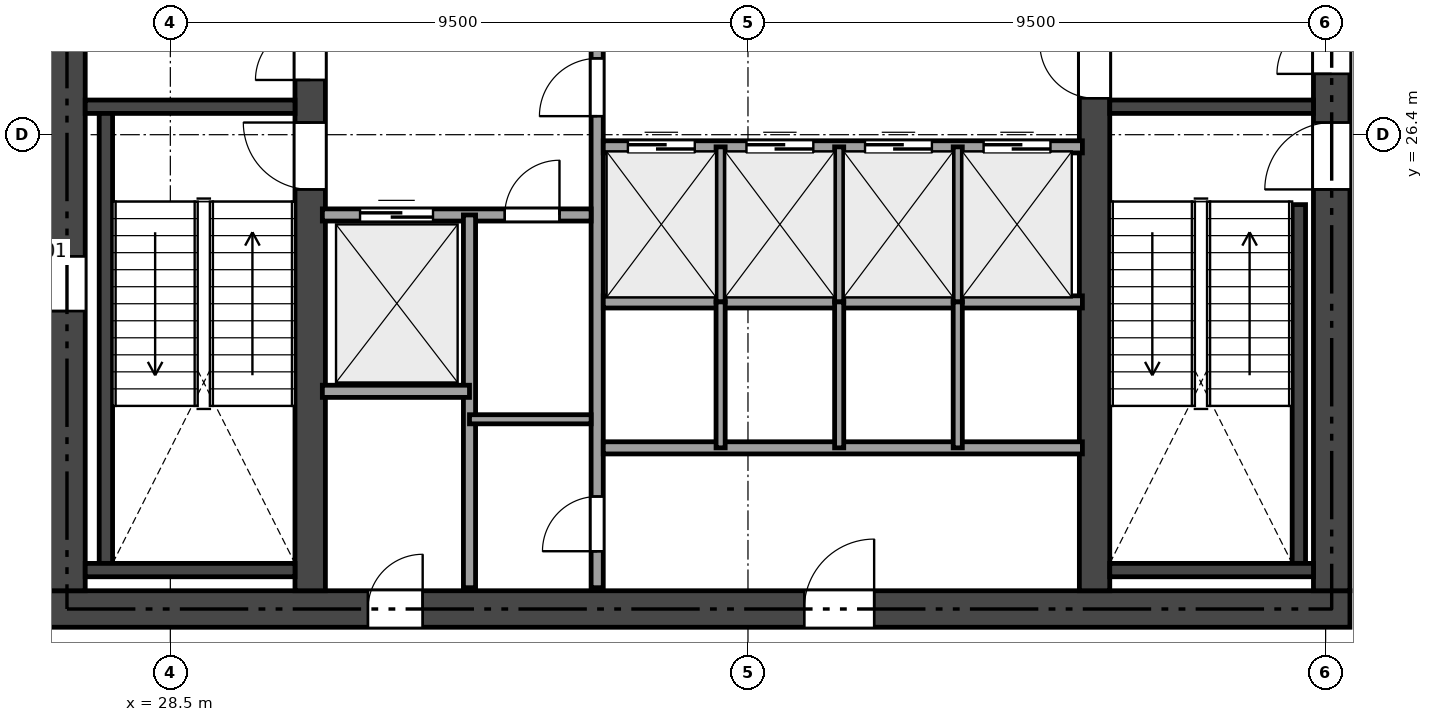
"""IFC4 building model, lengths in metres.
Left out: names, types, materials, properties, quantities, classifications, styles, units other than length and angle.
Written with IfcOpenShell. Run it as: python <this file> out.ifc"""

import sys

from ifc_helpers import new_model, si_unit, direction, frame, frame_2d, origin, place, context, subcontext, project, spatial, rectangle, extrude, element, fill, save


model = new_model("IFC4")
c1 = context("Model", 3, precision=1e-05, world=origin(), true_north=direction((0.0, 1.0)))
c2 = subcontext(c1, "Body", "Model", "MODEL_VIEW")
j1 = project(units=[si_unit("LENGTHUNIT", "METRE"), si_unit("PLANEANGLEUNIT", "RADIAN")], contexts=[c1])
p1 = place(None, origin())
s1 = spatial("IfcSite", under=j1, at=p1, CompositionType="ELEMENT")
p2 = place(p1, origin())
s2 = spatial("IfcBuilding", under=s1, at=p2, CompositionType="ELEMENT")
p3 = place(p2, frame((0.0, 0.0, 121.2)))
s3 = spatial("IfcBuildingStorey", under=s2, at=p3, CompositionType="ELEMENT", Elevation=121.2)
p4 = place(p3, frame((26.5, 18.6, 0.0), z_axis=(0.0, 0.0, 1.0), x_axis=(1.0, 0.0, 0.0)))
e1 = element("IfcWall", 1, at=p4, inside=s3, PredefinedType="SHEAR", context=c2, shape_type="SweptSolid", body=[
    extrude(rectangle(XDim=21.4, YDim=0.6, at=frame_2d((10.7, 0.0))), origin(), (0.0, 0.0, 1.0), 4.08),
])
p5 = place(p4, frame((12.425, 0.0, 0.0)))
e2 = element("IfcOpeningElement", 2, at=p5, cuts=e1, PredefinedType="OPENING", context=c2, shape_type="SweptSolid", body=[
    extrude(rectangle(XDim=1.15, YDim=2.15, at=frame_2d((0.575, 1.075))), frame((0.0, 0.31, 0.0), z_axis=(0.0, -1.0, 0.0), x_axis=(1.0, 0.0, 0.0)), (0.0, 0.0, 1.0), 0.62),
])
p6 = place(p4, frame((5.25, 0.0, 0.0)))
e3 = element("IfcOpeningElement", 3, at=p6, cuts=e1, PredefinedType="OPENING", context=c2, shape_type="SweptSolid", body=[
    extrude(rectangle(XDim=0.9, YDim=2.1, at=frame_2d((0.45, 1.05))), frame((0.0, 0.31, 0.0), z_axis=(0.0, -1.0, 0.0), x_axis=(1.0, 0.0, 0.0)), (0.0, 0.0, 1.0), 0.62),
])
p7 = place(p3, frame((26.8, 18.9, 0.0), z_axis=(0.0, 0.0, 1.0), x_axis=(0.0, 1.0, 0.0)))
e4 = element("IfcWall", 4, at=p7, inside=s3, PredefinedType="SHEAR", context=c2, shape_type="SweptSolid", body=[
    extrude(rectangle(XDim=15.0, YDim=0.6, at=frame_2d((7.5, 0.0))), origin(), (0.0, 0.0, 1.0), 4.08),
])
p8 = place(p7, frame((4.6, 0.0, 0.02)))
e5 = element("IfcOpeningElement", 5, at=p8, cuts=e4, PredefinedType="OPENING", context=c2, shape_type="SweptSolid", body=[
    extrude(rectangle(XDim=0.9, YDim=2.02, at=frame_2d((0.45, 1.01))), frame((0.0, 0.31, 0.0), z_axis=(0.0, -1.0, 0.0), x_axis=(1.0, 0.0, 0.0)), (0.0, 0.0, 1.0), 0.62),
])
p9 = place(p3, frame((47.6, 18.9, 0.0), z_axis=(0.0, 0.0, 1.0), x_axis=(0.0, 1.0, 0.0)))
e6 = element("IfcWall", 6, at=p9, inside=s3, PredefinedType="SHEAR", context=c2, shape_type="SweptSolid", body=[
    extrude(rectangle(XDim=15.0, YDim=0.6, at=frame_2d((7.5, 0.0))), origin(), (0.0, 0.0, 1.0), 4.08),
])
p10 = place(p9, frame((6.6, 0.0, 0.0)))
e7 = element("IfcOpeningElement", 7, at=p10, cuts=e6, PredefinedType="OPENING", context=c2, shape_type="SweptSolid", body=[
    extrude(rectangle(XDim=1.1, YDim=2.15, at=frame_2d((0.55, 1.075))), frame((0.0, 0.31, 0.0), z_axis=(0.0, -1.0, 0.0), x_axis=(1.0, 0.0, 0.0)), (0.0, 0.0, 1.0), 0.62),
])
p11 = place(p9, frame((8.5, 0.0, 0.0)))
e8 = element("IfcOpeningElement", 8, at=p11, cuts=e6, PredefinedType="OPENING", context=c2, shape_type="SweptSolid", body=[
    extrude(rectangle(XDim=0.9, YDim=2.1, at=frame_2d((0.45, 1.05))), frame((0.0, 0.31, 0.0), z_axis=(0.0, -1.0, 0.0), x_axis=(1.0, 0.0, 0.0)), (0.0, 0.0, 1.0), 0.62),
])
p12 = place(p9, frame((13.15, 0.0, 0.0)))
e9 = element("IfcOpeningElement", 9, at=p12, cuts=e6, PredefinedType="OPENING", context=c2, shape_type="SweptSolid", body=[
    extrude(rectangle(XDim=0.9, YDim=2.1, at=frame_2d((0.45, 1.05))), frame((0.0, 0.31, 0.0), z_axis=(0.0, -1.0, 0.0), x_axis=(1.0, 0.0, 0.0)), (0.0, 0.0, 1.0), 0.62),
])
p13 = place(p3, frame((30.8, 18.9, 0.0), z_axis=(0.0, 0.0, 1.0), x_axis=(0.0, 1.0, 0.0)))
e10 = element("IfcWall", 10, at=p13, inside=s3, PredefinedType="SHEAR", context=c2, shape_type="SweptSolid", body=[
    extrude(rectangle(XDim=15.0, YDim=0.5, at=frame_2d((7.5, 0.0))), origin(), (0.0, 0.0, 1.0), 4.08),
])
p14 = place(p13, frame((6.6, 0.0, 0.0)))
e11 = element("IfcOpeningElement", 11, at=p14, cuts=e10, PredefinedType="OPENING", context=c2, shape_type="SweptSolid", body=[
    extrude(rectangle(XDim=1.1, YDim=2.15, at=frame_2d((0.55, 1.075))), frame((0.0, 0.26, 0.0), z_axis=(0.0, -1.0, 0.0), x_axis=(1.0, 0.0, 0.0)), (0.0, 0.0, 1.0), 0.52),
])
p15 = place(p13, frame((8.4, 0.0, 0.0)))
e12 = element("IfcOpeningElement", 12, at=p15, cuts=e10, PredefinedType="OPENING", context=c2, shape_type="SweptSolid", body=[
    extrude(rectangle(XDim=0.9, YDim=2.1, at=frame_2d((0.45, 1.05))), frame((0.0, 0.26, 0.0), z_axis=(0.0, -1.0, 0.0), x_axis=(1.0, 0.0, 0.0)), (0.0, 0.0, 1.0), 0.52),
])
p16 = place(p3, frame((43.7, 18.9, 0.0), z_axis=(0.0, 0.0, 1.0), x_axis=(0.0, 1.0, 0.0)))
e13 = element("IfcWall", 13, at=p16, inside=s3, PredefinedType="SHEAR", context=c2, shape_type="SweptSolid", body=[
    extrude(rectangle(XDim=15.0, YDim=0.5, at=frame_2d((7.5, 0.0))), origin(), (0.0, 0.0, 1.0), 4.08),
])
p17 = place(p16, frame((8.1, 0.0, 0.0)))
e14 = element("IfcOpeningElement", 14, at=p17, cuts=e13, PredefinedType="OPENING", context=c2, shape_type="SweptSolid", body=[
    extrude(rectangle(XDim=0.9, YDim=2.1, at=frame_2d((0.45, 1.05))), frame((0.0, 0.26, 0.0), z_axis=(0.0, -1.0, 0.0), x_axis=(1.0, 0.0, 0.0)), (0.0, 0.0, 1.0), 0.52),
])
p18 = place(p3, frame((27.1, 26.86, 0.0), z_axis=(0.0, 0.0, 1.0), x_axis=(1.0, 0.0, 0.0)))
e15 = element("IfcWall", 15, at=p18, inside=s3, PredefinedType="SHEAR", context=c2, shape_type="SweptSolid", body=[
    extrude(rectangle(XDim=3.45, YDim=0.22, at=frame_2d((1.725, 0.0))), origin(), (0.0, 0.0, 1.0), 4.08),
])
p19 = place(p3, frame((27.44, 19.35, 0.0), z_axis=(0.0, 0.0, 1.0), x_axis=(0.0, 1.0, 0.0)))
e16 = element("IfcWall", 16, at=p19, inside=s3, PredefinedType="SHEAR", context=c2, shape_type="SweptSolid", body=[
    extrude(rectangle(XDim=7.4, YDim=0.22, at=frame_2d((3.7, 0.0))), origin(), (0.0, 0.0, 1.0), 4.08),
])
p20 = place(p3, frame((27.1, 19.24, 0.0), z_axis=(0.0, 0.0, 1.0), x_axis=(1.0, 0.0, 0.0)))
e17 = element("IfcWall", 17, at=p20, inside=s3, PredefinedType="SHEAR", context=c2, shape_type="SweptSolid", body=[
    extrude(rectangle(XDim=3.45, YDim=0.22, at=frame_2d((1.725, 0.0))), origin(), (0.0, 0.0, 1.0), 4.08),
])
p21 = place(p3, frame((43.95, 26.86, 0.0), z_axis=(0.0, 0.0, 1.0), x_axis=(1.0, 0.0, 0.0)))
e18 = element("IfcWall", 18, at=p21, inside=s3, PredefinedType="SHEAR", context=c2, shape_type="SweptSolid", body=[
    extrude(rectangle(XDim=3.35, YDim=0.22, at=frame_2d((1.675, 0.0))), origin(), (0.0, 0.0, 1.0), 4.08),
])
p22 = place(p3, frame((47.06, 19.35, 0.0), z_axis=(0.0, 0.0, 1.0), x_axis=(0.0, 1.0, 0.0)))
e19 = element("IfcWall", 19, at=p22, inside=s3, PredefinedType="SHEAR", context=c2, shape_type="SweptSolid", body=[
    extrude(rectangle(XDim=5.9, YDim=0.22, at=frame_2d((2.95, 0.0))), origin(), (0.0, 0.0, 1.0), 4.08),
])
p23 = place(p3, frame((43.95, 19.24, 0.0), z_axis=(0.0, 0.0, 1.0), x_axis=(1.0, 0.0, 0.0)))
e20 = element("IfcWall", 20, at=p23, inside=s3, PredefinedType="SHEAR", context=c2, shape_type="SweptSolid", body=[
    extrude(rectangle(XDim=3.35, YDim=0.22, at=frame_2d((1.675, 0.0))), origin(), (0.0, 0.0, 1.0), 4.08),
])
p24 = place(p3, frame((35.52, 18.95, 0.0), z_axis=(0.0, 0.0, 1.0), x_axis=(0.0, 1.0, 0.0)))
e21 = element("IfcWall", 21, at=p24, inside=s3, PredefinedType="SOLIDWALL", context=c2, shape_type="SweptSolid", body=[
    extrude(rectangle(XDim=14.9, YDim=0.2, at=frame_2d((7.45, 0.0))), origin(), (0.0, 0.0, 1.0), 3.601),
])
p25 = place(p24, frame((7.755, 0.0, 0.0)))
e22 = element("IfcOpeningElement", 22, at=p25, cuts=e21, PredefinedType="OPENING", context=c2, shape_type="SweptSolid", body=[
    extrude(rectangle(XDim=0.95, YDim=2.15, at=frame_2d((0.475, 1.075))), frame((0.0, 0.11, 0.0), z_axis=(0.0, -1.0, 0.0), x_axis=(1.0, 0.0, 0.0)), (0.0, 0.0, 1.0), 0.22),
])
p26 = place(p24, frame((0.6, 0.0, 0.0)))
e23 = element("IfcOpeningElement", 23, at=p26, cuts=e21, PredefinedType="OPENING", context=c2, shape_type="SweptSolid", body=[
    extrude(rectangle(XDim=0.9, YDim=2.1, at=frame_2d((0.45, 1.05))), frame((0.0, 0.11, 0.0), z_axis=(0.0, -1.0, 0.0), x_axis=(1.0, 0.0, 0.0)), (0.0, 0.0, 1.0), 0.22),
])
p27 = place(p3, frame((31.0, 25.08, 0.0), z_axis=(0.0, 0.0, 1.0), x_axis=(1.0, 0.0, 0.0)))
e24 = element("IfcWall", 24, at=p27, inside=s3, PredefinedType="SOLIDWALL", context=c2, shape_type="SweptSolid", body=[
    extrude(rectangle(XDim=4.42, YDim=0.2, at=frame_2d((2.21, 0.0))), origin(), (0.0, 0.0, 1.0), 4.08),
])
p28 = place(p27, frame((3.0, 0.0, 0.0)))
e25 = element("IfcOpeningElement", 25, at=p28, cuts=e24, PredefinedType="OPENING", context=c2, shape_type="SweptSolid", body=[
    extrude(rectangle(XDim=0.9, YDim=2.1, at=frame_2d((0.45, 1.05))), frame((0.0, 0.11, 0.0), z_axis=(0.0, -1.0, 0.0), x_axis=(1.0, 0.0, 0.0)), (0.0, 0.0, 1.0), 0.22),
])
p29 = place(p27, frame((0.62, 0.0, 0.0)))
e26 = element("IfcOpeningElement", 26, at=p29, cuts=e24, PredefinedType="OPENING", context=c2, shape_type="SweptSolid", body=[
    extrude(rectangle(XDim=1.2, YDim=2.15, at=frame_2d((0.6, 1.075))), frame((0.0, 0.11, 0.0), z_axis=(0.0, -1.0, 0.0), x_axis=(1.0, 0.0, 0.0)), (0.0, 0.0, 1.0), 0.22),
])
p30 = place(p3, frame((33.42, 18.95, 0.0), z_axis=(0.0, 0.0, 1.0), x_axis=(0.0, 1.0, 0.0)))
e27 = element("IfcWall", 27, at=p30, inside=s3, PredefinedType="SOLIDWALL", context=c2, shape_type="SweptSolid", body=[
    extrude(rectangle(XDim=6.13, YDim=0.2, at=frame_2d((3.065, 0.0))), origin(), (0.0, 0.0, 1.0), 3.601),
])
p31 = place(p3, frame((31.0, 22.18, 0.0), z_axis=(0.0, 0.0, 1.0), x_axis=(1.0, 0.0, 0.0)))
e28 = element("IfcWall", 28, at=p31, inside=s3, PredefinedType="SOLIDWALL", context=c2, shape_type="SweptSolid", body=[
    extrude(rectangle(XDim=2.42, YDim=0.2, at=frame_2d((1.21, 0.0))), origin(), (0.0, 0.0, 1.0), 4.08),
])
p32 = place(p3, frame((33.42, 21.72, 0.0), z_axis=(0.0, 0.0, 1.0), x_axis=(1.0, 0.0, 0.0)))
e29 = element("IfcWall", 29, at=p32, inside=s3, PredefinedType="PARTITIONING", context=c2, shape_type="SweptSolid", body=[
    extrude(rectangle(XDim=2.0, YDim=0.15, at=frame_2d((1.0, 0.0))), origin(), (0.0, 0.0, 1.0), 4.08),
])
p33 = place(p3, frame((35.62, 26.2, 0.0), z_axis=(0.0, 0.0, 1.0), x_axis=(1.0, 0.0, 0.0)))
e30 = element("IfcWall", 30, at=p33, inside=s3, PredefinedType="SOLIDWALL", context=c2, shape_type="SweptSolid", body=[
    extrude(rectangle(XDim=7.88, YDim=0.2, at=frame_2d((3.94, 0.0))), origin(), (0.0, 0.0, 1.0), 4.08),
])
p34 = place(p33, frame((0.405, 0.0, 0.0)))
e31 = element("IfcOpeningElement", 31, at=p34, cuts=e30, PredefinedType="OPENING", context=c2, shape_type="SweptSolid", body=[
    extrude(rectangle(XDim=1.1, YDim=2.15, at=frame_2d((0.55, 1.075))), frame((0.0, 0.11, 0.0), z_axis=(0.0, -1.0, 0.0), x_axis=(1.0, 0.0, 0.0)), (0.0, 0.0, 1.0), 0.22),
])
p35 = place(p33, frame((2.355, 0.0, 0.0)))
e32 = element("IfcOpeningElement", 32, at=p35, cuts=e30, PredefinedType="OPENING", context=c2, shape_type="SweptSolid", body=[
    extrude(rectangle(XDim=1.1, YDim=2.15, at=frame_2d((0.55, 1.075))), frame((0.0, 0.11, 0.0), z_axis=(0.0, -1.0, 0.0), x_axis=(1.0, 0.0, 0.0)), (0.0, 0.0, 1.0), 0.22),
])
p36 = place(p33, frame((4.305, 0.0, 0.0)))
e33 = element("IfcOpeningElement", 33, at=p36, cuts=e30, PredefinedType="OPENING", context=c2, shape_type="SweptSolid", body=[
    extrude(rectangle(XDim=1.1, YDim=2.15, at=frame_2d((0.55, 1.075))), frame((0.0, 0.11, 0.0), z_axis=(0.0, -1.0, 0.0), x_axis=(1.0, 0.0, 0.0)), (0.0, 0.0, 1.0), 0.22),
])
p37 = place(p33, frame((6.255, 0.0, 0.0)))
e34 = element("IfcOpeningElement", 34, at=p37, cuts=e30, PredefinedType="OPENING", context=c2, shape_type="SweptSolid", body=[
    extrude(rectangle(XDim=1.1, YDim=2.15, at=frame_2d((0.55, 1.075))), frame((0.0, 0.11, 0.0), z_axis=(0.0, -1.0, 0.0), x_axis=(1.0, 0.0, 0.0)), (0.0, 0.0, 1.0), 0.22),
])
p38 = place(p3, frame((35.62, 23.65, 0.0), z_axis=(0.0, 0.0, 1.0), x_axis=(1.0, 0.0, 0.0)))
e35 = element("IfcWall", 35, at=p38, inside=s3, PredefinedType="SOLIDWALL", context=c2, shape_type="SweptSolid", body=[
    extrude(rectangle(XDim=7.88, YDim=0.2, at=frame_2d((3.94, 0.0))), origin(), (0.0, 0.0, 1.0), 3.601),
])
p39 = place(p3, frame((35.62, 21.25, 0.0), z_axis=(0.0, 0.0, 1.0), x_axis=(1.0, 0.0, 0.0)))
e36 = element("IfcWall", 36, at=p39, inside=s3, PredefinedType="SOLIDWALL", context=c2, shape_type="SweptSolid", body=[
    extrude(rectangle(XDim=7.88, YDim=0.2, at=frame_2d((3.94, 0.0))), origin(), (0.0, 0.0, 1.0), 4.08),
])
for number, where, z_axis, x_axis in (
    (37, (37.55, 23.65, 0.0), (0.0, 0.0, 1.0), (0.0, 1.0, 0.0)),
    (38, (39.5, 23.65, 0.0), (0.0, 0.0, 1.0), (0.0, 1.0, 0.0)),
    (39, (41.45, 23.65, 0.0), (0.0, 0.0, 1.0), (0.0, 1.0, 0.0)),
):
    element("IfcWall", number, at=place(p3, frame(where, z_axis=z_axis, x_axis=x_axis)), inside=s3, PredefinedType="PARTITIONING", context=c2, shape_type="SweptSolid", body=[
        extrude(rectangle(XDim=2.55, YDim=0.15, at=frame_2d((1.275, 0.0))), origin(), (0.0, 0.0, 1.0), 3.601),
    ])
for number, where, z_axis, x_axis in (
    (40, (37.55, 21.25, 0.0), (0.0, 0.0, 1.0), (0.0, 1.0, 0.0)),
    (41, (39.5, 21.25, 0.0), (0.0, 0.0, 1.0), (0.0, 1.0, 0.0)),
    (42, (41.45, 21.25, 0.0), (0.0, 0.0, 1.0), (0.0, 1.0, 0.0)),
):
    element("IfcWall", number, at=place(p3, frame(where, z_axis=z_axis, x_axis=x_axis)), inside=s3, PredefinedType="PARTITIONING", context=c2, shape_type="SweptSolid", body=[
        extrude(rectangle(XDim=2.4, YDim=0.15, at=frame_2d((1.2, 0.0))), origin(), (0.0, 0.0, 1.0), 3.601),
    ])
p40 = place(p8, origin())
e43 = element("IfcDoor", 43, at=p40, inside=s3, OperationType="SINGLE_SWING_LEFT", PredefinedType="TRAPDOOR", context=c2, shape_type="SweptSolid", body=[
    extrude(rectangle(XDim=0.9, YDim=2.02, at=frame_2d((0.45, 1.01))), frame((0.0, 0.025, 0.0), z_axis=(0.0, -1.0, 0.0), x_axis=(1.0, 0.0, 0.0)), (0.0, 0.0, 1.0), 0.05),
])
fill(e5, e43)
p41 = place(p14, origin())
e44 = element("IfcDoor", 44, at=p41, inside=s3, OperationType="SINGLE_SWING_RIGHT", PredefinedType="DOOR", context=c2, shape_type="SweptSolid", body=[
    extrude(rectangle(XDim=1.1, YDim=2.15, at=frame_2d((0.55, 1.075))), frame((0.0, 0.025, 0.0), z_axis=(0.0, -1.0, 0.0), x_axis=(1.0, 0.0, 0.0)), (0.0, 0.0, 1.0), 0.05),
])
fill(e11, e44)
p42 = place(p10, origin())
e45 = element("IfcDoor", 45, at=p42, inside=s3, OperationType="SINGLE_SWING_LEFT", PredefinedType="DOOR", context=c2, shape_type="SweptSolid", body=[
    extrude(rectangle(XDim=1.1, YDim=2.15, at=frame_2d((0.55, 1.075))), frame((0.0, 0.025, 0.0), z_axis=(0.0, -1.0, 0.0), x_axis=(1.0, 0.0, 0.0)), (0.0, 0.0, 1.0), 0.05),
])
fill(e7, e45)
p43 = place(p25, origin())
e46 = element("IfcDoor", 46, at=p43, inside=s3, OperationType="SINGLE_SWING_LEFT", PredefinedType="DOOR", context=c2, shape_type="SweptSolid", body=[
    extrude(rectangle(XDim=0.95, YDim=2.15, at=frame_2d((0.475, 1.075))), frame((0.0, 0.025, 0.0), z_axis=(0.0, -1.0, 0.0), x_axis=(1.0, 0.0, 0.0)), (0.0, 0.0, 1.0), 0.05),
])
fill(e22, e46)
p44 = place(p17, origin())
e47 = element("IfcDoor", 47, at=p44, inside=s3, OperationType="SINGLE_SWING_RIGHT", PredefinedType="DOOR", context=c2, shape_type="SweptSolid", body=[
    extrude(rectangle(XDim=0.9, YDim=2.1, at=frame_2d((0.45, 1.05))), frame((0.0, 0.025, 0.0), z_axis=(0.0, -1.0, 0.0), x_axis=(1.0, 0.0, 0.0)), (0.0, 0.0, 1.0), 0.05),
])
fill(e14, e47)
p45 = place(p11, origin())
e48 = element("IfcDoor", 48, at=p45, inside=s3, OperationType="SINGLE_SWING_LEFT", PredefinedType="DOOR", context=c2, shape_type="SweptSolid", body=[
    extrude(rectangle(XDim=0.9, YDim=2.1, at=frame_2d((0.45, 1.05))), frame((0.0, 0.025, 0.0), z_axis=(0.0, -1.0, 0.0), x_axis=(1.0, 0.0, 0.0)), (0.0, 0.0, 1.0), 0.05),
])
fill(e8, e48)
p46 = place(p5, origin())
e49 = element("IfcDoor", 49, at=p46, inside=s3, OperationType="SINGLE_SWING_RIGHT", PredefinedType="DOOR", context=c2, shape_type="SweptSolid", body=[
    extrude(rectangle(XDim=1.15, YDim=2.15, at=frame_2d((0.575, 1.075))), frame((0.0, 0.025, 0.0), z_axis=(0.0, -1.0, 0.0), x_axis=(1.0, 0.0, 0.0)), (0.0, 0.0, 1.0), 0.05),
])
fill(e2, e49)
p47 = place(p15, origin())
e50 = element("IfcDoor", 50, at=p47, inside=s3, OperationType="SINGLE_SWING_LEFT", PredefinedType="DOOR", context=c2, shape_type="SweptSolid", body=[
    extrude(rectangle(XDim=0.9, YDim=2.1, at=frame_2d((0.45, 1.05))), frame((0.0, 0.025, 0.0), z_axis=(0.0, -1.0, 0.0), x_axis=(1.0, 0.0, 0.0)), (0.0, 0.0, 1.0), 0.05),
])
fill(e12, e50)
p48 = place(p6, origin())
e51 = element("IfcDoor", 51, at=p48, inside=s3, OperationType="SINGLE_SWING_RIGHT", PredefinedType="DOOR", context=c2, shape_type="SweptSolid", body=[
    extrude(rectangle(XDim=0.9, YDim=2.1, at=frame_2d((0.45, 1.05))), frame((0.0, 0.025, 0.0), z_axis=(0.0, -1.0, 0.0), x_axis=(1.0, 0.0, 0.0)), (0.0, 0.0, 1.0), 0.05),
])
fill(e3, e51)
p49 = place(p26, origin())
e52 = element("IfcDoor", 52, at=p49, inside=s3, OperationType="SINGLE_SWING_LEFT", PredefinedType="DOOR", context=c2, shape_type="SweptSolid", body=[
    extrude(rectangle(XDim=0.9, YDim=2.1, at=frame_2d((0.45, 1.05))), frame((0.0, 0.025, 0.0), z_axis=(0.0, -1.0, 0.0), x_axis=(1.0, 0.0, 0.0)), (0.0, 0.0, 1.0), 0.05),
])
fill(e23, e52)
p50 = place(p28, origin())
e53 = element("IfcDoor", 53, at=p50, inside=s3, OperationType="SINGLE_SWING_RIGHT", PredefinedType="DOOR", context=c2, shape_type="SweptSolid", body=[
    extrude(rectangle(XDim=0.9, YDim=2.1, at=frame_2d((0.45, 1.05))), frame((0.0, 0.025, 0.0), z_axis=(0.0, -1.0, 0.0), x_axis=(1.0, 0.0, 0.0)), (0.0, 0.0, 1.0), 0.05),
])
fill(e25, e53)
p51 = place(p29, origin())
e54 = element("IfcDoor", 54, at=p51, inside=s3, OperationType="SLIDING_TO_LEFT", PredefinedType="DOOR", context=c2, shape_type="SweptSolid", body=[
    extrude(rectangle(XDim=1.2, YDim=2.15, at=frame_2d((0.6, 1.075))), frame((0.0, 0.025, 0.0), z_axis=(0.0, -1.0, 0.0), x_axis=(1.0, 0.0, 0.0)), (0.0, 0.0, 1.0), 0.05),
])
fill(e26, e54)
p52 = place(p34, origin())
e55 = element("IfcDoor", 55, at=p52, inside=s3, OperationType="SLIDING_TO_LEFT", PredefinedType="DOOR", context=c2, shape_type="SweptSolid", body=[
    extrude(rectangle(XDim=1.1, YDim=2.15, at=frame_2d((0.55, 1.075))), frame((0.0, 0.025, 0.0), z_axis=(0.0, -1.0, 0.0), x_axis=(1.0, 0.0, 0.0)), (0.0, 0.0, 1.0), 0.05),
])
fill(e31, e55)
p53 = place(p35, origin())
e56 = element("IfcDoor", 56, at=p53, inside=s3, OperationType="SLIDING_TO_LEFT", PredefinedType="DOOR", context=c2, shape_type="SweptSolid", body=[
    extrude(rectangle(XDim=1.1, YDim=2.15, at=frame_2d((0.55, 1.075))), frame((0.0, 0.025, 0.0), z_axis=(0.0, -1.0, 0.0), x_axis=(1.0, 0.0, 0.0)), (0.0, 0.0, 1.0), 0.05),
])
fill(e32, e56)
p54 = place(p36, origin())
e57 = element("IfcDoor", 57, at=p54, inside=s3, OperationType="SLIDING_TO_LEFT", PredefinedType="DOOR", context=c2, shape_type="SweptSolid", body=[
    extrude(rectangle(XDim=1.1, YDim=2.15, at=frame_2d((0.55, 1.075))), frame((0.0, 0.025, 0.0), z_axis=(0.0, -1.0, 0.0), x_axis=(1.0, 0.0, 0.0)), (0.0, 0.0, 1.0), 0.05),
])
fill(e33, e57)
p55 = place(p37, origin())
e58 = element("IfcDoor", 58, at=p55, inside=s3, OperationType="SLIDING_TO_LEFT", PredefinedType="DOOR", context=c2, shape_type="SweptSolid", body=[
    extrude(rectangle(XDim=1.1, YDim=2.15, at=frame_2d((0.55, 1.075))), frame((0.0, 0.025, 0.0), z_axis=(0.0, -1.0, 0.0), x_axis=(1.0, 0.0, 0.0)), (0.0, 0.0, 1.0), 0.05),
])
fill(e34, e58)
save(model, sys.argv[1])
